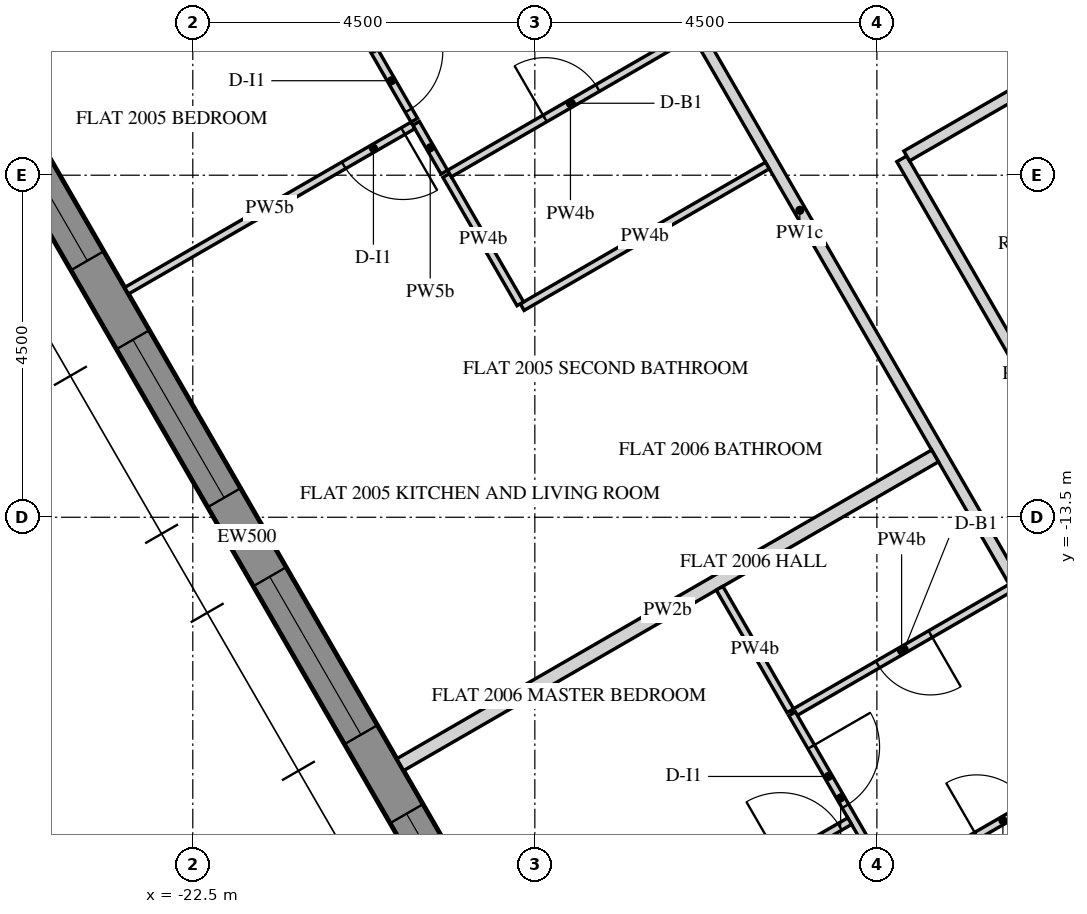
"""IFC4 building model, lengths in metres.
Left out: names, types, materials, properties, quantities, classifications, styles, units other than length and angle.
Written with IfcOpenShell. Run it as: python <this file> out.ifc"""

import sys

from ifc_helpers import new_model, si_unit, direction, frame, frame_2d, origin, place, context, subcontext, project, spatial, polyline, rectangle, outline, extrude, element, fill, save


model = new_model("IFC4")
c1 = context("Model", 3, precision=1e-05, world=origin(), true_north=direction((0.0, 1.0)))
c2 = subcontext(c1, "Body", "Model", "MODEL_VIEW")
j1 = project(units=[si_unit("LENGTHUNIT", "METRE"), si_unit("PLANEANGLEUNIT", "RADIAN")], contexts=[c1])
p1 = place(None, origin())
s1 = spatial("IfcSite", under=j1, at=p1, CompositionType="ELEMENT")
p2 = place(p1, origin())
s2 = spatial("IfcBuilding", under=s1, at=p2, CompositionType="ELEMENT")
p3 = place(p2, frame((0.0, 0.0, 260.1)))
s3 = spatial("IfcBuildingStorey", under=s2, at=p3, CompositionType="ELEMENT", Elevation=260.1)
p4 = place(p3, frame((-28.149, -2.745, -0.15), z_axis=(0.0, 0.0, 1.0), x_axis=(0.500003737743, -0.866023245787, 0.0)))
e1 = element("IfcWall", 1, at=p4, inside=s3, PredefinedType="SOLIDWALL", context=c2, shape_type="SweptSolid", body=[
    extrude(outline(polyline([(-0.021, -0.25), (25.468, -0.25), (25.421, 0.25), (0.021, 0.25), (-0.021, -0.25)])), origin(), (0.0, 0.0, 1.0), 3.9),
])
p5 = place(p4, frame((2.522, 0.0, 0.75)))
e2 = element("IfcOpeningElement", 2, at=p5, cuts=e1, PredefinedType="OPENING", context=c2, shape_type="SweptSolid", body=[
    extrude(rectangle(XDim=2.4, YDim=2.7, at=frame_2d((1.2, 1.35))), frame((0.0, 0.26, 0.0), z_axis=(0.0, -1.0, 0.0), x_axis=(1.0, 0.0, 0.0)), (0.0, 0.0, 1.0), 0.52),
])
p6 = place(p4, frame((6.122, 0.0, 0.75)))
e3 = element("IfcOpeningElement", 3, at=p6, cuts=e1, PredefinedType="OPENING", context=c2, shape_type="SweptSolid", body=[
    extrude(rectangle(XDim=2.4, YDim=2.7, at=frame_2d((1.2, 1.35))), frame((0.0, 0.26, 0.0), z_axis=(0.0, -1.0, 0.0), x_axis=(1.0, 0.0, 0.0)), (0.0, 0.0, 1.0), 0.52),
])
p7 = place(p4, frame((9.722, 0.0, 0.75)))
e4 = element("IfcOpeningElement", 4, at=p7, cuts=e1, PredefinedType="OPENING", context=c2, shape_type="SweptSolid", body=[
    extrude(rectangle(XDim=2.4, YDim=2.7, at=frame_2d((1.2, 1.35))), frame((0.0, 0.26, 0.0), z_axis=(0.0, -1.0, 0.0), x_axis=(1.0, 0.0, 0.0)), (0.0, 0.0, 1.0), 0.52),
])
p8 = place(p4, frame((13.323, 0.0, 0.75)))
e5 = element("IfcOpeningElement", 5, at=p8, cuts=e1, PredefinedType="OPENING", context=c2, shape_type="SweptSolid", body=[
    extrude(rectangle(XDim=2.4, YDim=2.7, at=frame_2d((1.2, 1.35))), frame((0.0, 0.26, 0.0), z_axis=(0.0, -1.0, 0.0), x_axis=(1.0, 0.0, 0.0)), (0.0, 0.0, 1.0), 0.52),
])
p9 = place(p4, frame((16.922, 0.0, 0.75)))
e6 = element("IfcOpeningElement", 6, at=p9, cuts=e1, PredefinedType="OPENING", context=c2, shape_type="SweptSolid", body=[
    extrude(rectangle(XDim=2.4, YDim=2.7, at=frame_2d((1.2, 1.35))), frame((0.0, 0.26, 0.0), z_axis=(0.0, -1.0, 0.0), x_axis=(1.0, 0.0, 0.0)), (0.0, 0.0, 1.0), 0.52),
])
p10 = place(p4, frame((20.522, 0.0, 0.75)))
e7 = element("IfcOpeningElement", 7, at=p10, cuts=e1, PredefinedType="OPENING", context=c2, shape_type="SweptSolid", body=[
    extrude(rectangle(XDim=2.4, YDim=2.7, at=frame_2d((1.2, 1.35))), frame((0.0, 0.26, 0.0), z_axis=(0.0, -1.0, 0.0), x_axis=(1.0, 0.0, 0.0)), (0.0, 0.0, 1.0), 0.52),
])
p11 = place(p3, frame((-12.471, 0.0, -0.15), z_axis=(0.0, 0.0, 1.0), x_axis=(0.499996419489, -0.866027470984, 0.0)))
e8 = element("IfcWall", 8, at=p11, inside=s3, PredefinedType="SHEAR", context=c2, shape_type="SweptSolid", body=[
    extrude(outline(polyline([(-0.115, -0.2), (12.586, -0.2), (12.355, 0.2), (0.115, 0.2), (-0.115, -0.2)])), origin(), (0.0, 0.0, 1.0), 3.9),
])
p12 = place(p11, frame((5.306, 0.0, 0.15)))
e9 = element("IfcOpeningElement", 9, at=p12, cuts=e8, PredefinedType="OPENING", context=c2, shape_type="SweptSolid", body=[
    extrude(rectangle(XDim=1.8, YDim=2.4, at=frame_2d((0.9, 1.2))), frame((0.0, 0.21, 0.0), z_axis=(0.0, -1.0, 0.0), x_axis=(1.0, 0.0, 0.0)), (0.0, 0.0, 1.0), 0.42),
])
p13 = place(p3, frame((-18.338, -2.838, 0.0), z_axis=(0.0, 0.0, 1.0), x_axis=(0.499999693481, -0.866025580753, 0.0)))
e10 = element("IfcWall", 10, at=p13, inside=s3, PredefinedType="PARTITIONING", context=c2, shape_type="SweptSolid", body=[
    extrude(rectangle(XDim=15.296, YDim=0.15, at=frame_2d((7.648, 0.0))), origin(), (0.0, 0.0, 1.0), 2.823),
])
p14 = place(p13, frame((2.925, 0.0, 0.0)))
e11 = element("IfcOpeningElement", 11, at=p14, cuts=e10, PredefinedType="OPENING", context=c2, shape_type="SweptSolid", body=[
    extrude(rectangle(XDim=1.0, YDim=2.1, at=frame_2d((0.5, 1.05))), frame((0.0, 0.085, 0.0), z_axis=(0.0, -1.0, 0.0), x_axis=(1.0, 0.0, 0.0)), (0.0, 0.0, 1.0), 0.17),
])
p15 = place(p13, frame((14.136, 0.0, 0.0)))
e12 = element("IfcOpeningElement", 12, at=p15, cuts=e10, PredefinedType="OPENING", context=c2, shape_type="SweptSolid", body=[
    extrude(rectangle(XDim=1.0, YDim=2.1, at=frame_2d((0.5, 1.05))), frame((0.0, 0.085, 0.0), z_axis=(0.0, -1.0, 0.0), x_axis=(1.0, 0.0, 0.0)), (0.0, 0.0, 1.0), 0.17),
])
p16 = place(p3, frame((-9.901, -14.451, 0.0), z_axis=(0.0, 0.0, 1.0), x_axis=(-0.49999161165, 0.866030246746, 0.0)))
e13 = element("IfcWall", 13, at=p16, inside=s3, PredefinedType="PARTITIONING", context=c2, shape_type="SweptSolid", body=[
    extrude(rectangle(XDim=6.543, YDim=0.15, at=frame_2d((3.271, 0.0))), origin(), (0.0, 0.0, 1.0), 2.823),
])
p17 = place(p3, frame((-13.108, -8.747, 0.0), z_axis=(0.0, 0.0, 1.0), x_axis=(0.866024684746, 0.500001245408, 0.0)))
e14 = element("IfcWall", 14, at=p17, inside=s3, PredefinedType="PARTITIONING", context=c2, shape_type="SweptSolid", body=[
    extrude(rectangle(XDim=4.725, YDim=0.15, at=frame_2d((2.363, 0.0))), origin(), (0.0, 0.0, 1.0), 2.823),
])
p18 = place(p3, frame((-19.191, -8.96, 0.0), z_axis=(0.0, 0.0, 1.0), x_axis=(-0.500036104519, 0.866004557827, 0.0)))
e15 = element("IfcWall", 15, at=p18, inside=s3, PredefinedType="PARTITIONING", context=c2, shape_type="SweptSolid", body=[
    extrude(rectangle(XDim=0.741, YDim=0.1, at=frame_2d((0.371, 0.0))), origin(), (0.0, 0.0, 1.0), 2.823),
])
p19 = place(p3, frame((-19.604, -8.345, 0.0), z_axis=(0.0, 0.0, 1.0), x_axis=(-0.866027639635, -0.499996127374, 0.0)))
e16 = element("IfcWall", 16, at=p19, inside=s3, PredefinedType="PARTITIONING", context=c2, shape_type="SweptSolid", body=[
    extrude(rectangle(XDim=4.35, YDim=0.1, at=frame_2d((2.175, 0.0))), origin(), (0.0, 0.0, 1.0), 2.823),
])
p20 = place(p19, frame((0.15, 0.0, 0.0)))
e17 = element("IfcOpeningElement", 17, at=p20, cuts=e16, PredefinedType="OPENING", context=c2, shape_type="SweptSolid", body=[
    extrude(rectangle(XDim=0.9, YDim=2.1, at=frame_2d((0.45, 1.05))), frame((0.0, 0.06, 0.0), z_axis=(0.0, -1.0, 0.0), x_axis=(1.0, 0.0, 0.0)), (0.0, 0.0, 1.0), 0.12),
])
p21 = place(p3, frame((-14.94, -8.873, 0.0), z_axis=(0.0, 0.0, 1.0), x_axis=(-0.866056803351, -0.499945610411, 0.0)))
e18 = element("IfcWall", 18, at=p21, inside=s3, PredefinedType="PARTITIONING", context=c2, shape_type="SweptSolid", body=[
    extrude(rectangle(XDim=3.725, YDim=0.1, at=frame_2d((1.863, 0.0))), origin(), (0.0, 0.0, 1.0), 2.823),
])
p22 = place(p3, frame((-18.191, -10.692, 0.0), z_axis=(0.0, 0.0, 1.0), x_axis=(-0.500043961785, 0.866000020948, 0.0)))
e19 = element("IfcWall", 19, at=p22, inside=s3, PredefinedType="PARTITIONING", context=c2, shape_type="SweptSolid", body=[
    extrude(rectangle(XDim=1.95, YDim=0.1, at=frame_2d((0.975, 0.0))), origin(), (0.0, 0.0, 1.0), 2.823),
])
p23 = place(p3, frame((-19.771, -16.755, 0.0), z_axis=(0.0, 0.0, 1.0), x_axis=(0.866022959057, 0.500004234368, 0.0)))
e20 = element("IfcWall", 20, at=p23, inside=s3, PredefinedType="PARTITIONING", context=c2, shape_type="SweptSolid", body=[
    extrude(rectangle(XDim=8.125, YDim=0.18, at=frame_2d((4.062, 0.0))), origin(), (0.0, 0.0, 1.0), 2.823),
])
p24 = place(p3, frame((-20.667, -6.403, 0.0), z_axis=(0.0, 0.0, 1.0), x_axis=(0.499999270699, -0.866025824846, 0.0)))
e21 = element("IfcWall", 21, at=p24, inside=s3, PredefinedType="PARTITIONING", context=c2, shape_type="SweptSolid", body=[
    extrude(rectangle(XDim=2.163, YDim=0.1, at=frame_2d((1.082, 0.0))), origin(), (0.0, 0.0, 1.0), 2.823),
])
p25 = place(p24, frame((1.113, 0.0, 0.0)))
e22 = element("IfcOpeningElement", 22, at=p25, cuts=e21, PredefinedType="OPENING", context=c2, shape_type="SweptSolid", body=[
    extrude(rectangle(XDim=0.9, YDim=2.1, at=frame_2d((0.45, 1.05))), frame((0.0, 0.06, 0.0), z_axis=(0.0, -1.0, 0.0), x_axis=(1.0, 0.0, 0.0)), (0.0, 0.0, 1.0), 0.12),
])
p26 = place(p3, frame((-19.123, -8.978, 0.0), z_axis=(0.0, 0.0, 1.0), x_axis=(0.866006363297, 0.500032977642, 0.0)))
e23 = element("IfcWall", 23, at=p26, inside=s3, PredefinedType="PARTITIONING", context=c2, shape_type="SweptSolid", body=[
    extrude(rectangle(XDim=3.675, YDim=0.1, at=frame_2d((1.837, 0.0))), origin(), (0.0, 0.0, 1.0), 2.823),
])
p27 = place(p26, frame((1.45, 0.0, 0.0)))
e24 = element("IfcOpeningElement", 24, at=p27, cuts=e23, PredefinedType="OPENING", context=c2, shape_type="SweptSolid", body=[
    extrude(rectangle(XDim=0.8, YDim=2.1, at=frame_2d((0.4, 1.05))), frame((0.0, 0.06, 0.0), z_axis=(0.0, -1.0, 0.0), x_axis=(1.0, 0.0, 0.0)), (0.0, 0.0, 1.0), 0.12),
])
p28 = place(p3, frame((-25.171, -7.402, 0.0), z_axis=(0.0, 0.0, 1.0), x_axis=(0.866013608182, 0.500020430026, 0.0)))
e25 = element("IfcWall", 25, at=p28, inside=s3, PredefinedType="PARTITIONING", context=c2, shape_type="SweptSolid", body=[
    extrude(rectangle(XDim=4.35, YDim=0.1, at=frame_2d((2.175, 0.0))), origin(), (0.0, 0.0, 1.0), 2.823),
])
p29 = place(p28, frame((3.3, 0.0, 0.0)))
e26 = element("IfcOpeningElement", 26, at=p29, cuts=e25, PredefinedType="OPENING", context=c2, shape_type="SweptSolid", body=[
    extrude(rectangle(XDim=0.9, YDim=2.1, at=frame_2d((0.45, 1.05))), frame((0.0, 0.06, 0.0), z_axis=(0.0, -1.0, 0.0), x_axis=(1.0, 0.0, 0.0)), (0.0, 0.0, 1.0), 0.12),
])
p30 = place(p3, frame((-4.831, -15.75, 0.0), z_axis=(0.0, 0.0, 1.0), x_axis=(-0.866012441049, -0.500022451445, 0.0)))
e27 = element("IfcWall", 27, at=p30, inside=s3, PredefinedType="PARTITIONING", context=c2, shape_type="SweptSolid", body=[
    extrude(rectangle(XDim=8.641, YDim=0.1, at=frame_2d((4.321, 0.0))), origin(), (0.0, 0.0, 1.0), 2.823),
])
p31 = place(p3, frame((-11.735, -14.425, 0.0), z_axis=(0.0, 0.0, 1.0), x_axis=(-0.866033959199, -0.499985181294, 0.0)))
e28 = element("IfcWall", 28, at=p31, inside=s3, PredefinedType="PARTITIONING", context=c2, shape_type="SweptSolid", body=[
    extrude(rectangle(XDim=3.325, YDim=0.1, at=frame_2d((1.662, 0.0))), origin(), (0.0, 0.0, 1.0), 2.823),
])
p32 = place(p31, frame((1.225, 0.0, 0.0)))
e29 = element("IfcOpeningElement", 29, at=p32, cuts=e28, PredefinedType="OPENING", context=c2, shape_type="SweptSolid", body=[
    extrude(rectangle(XDim=0.8, YDim=2.1, at=frame_2d((0.4, 1.05))), frame((0.0, 0.06, 0.0), z_axis=(0.0, -1.0, 0.0), x_axis=(1.0, 0.0, 0.0)), (0.0, 0.0, 1.0), 0.12),
])
p33 = place(p3, frame((-14.615, -16.085, 0.0), z_axis=(0.0, 0.0, 1.0), x_axis=(0.499943114462, -0.866058244174, 0.0)))
e30 = element("IfcWall", 30, at=p33, inside=s3, PredefinedType="PARTITIONING", context=c2, shape_type="SweptSolid", body=[
    extrude(rectangle(XDim=2.554, YDim=0.1, at=frame_2d((1.277, 0.0))), origin(), (0.0, 0.0, 1.0), 2.823),
])
p34 = place(p33, frame((0.502, 0.0, 0.0)))
e31 = element("IfcOpeningElement", 31, at=p34, cuts=e30, PredefinedType="OPENING", context=c2, shape_type="SweptSolid", body=[
    extrude(rectangle(XDim=0.9, YDim=2.1, at=frame_2d((0.45, 1.05))), frame((0.0, 0.06, 0.0), z_axis=(0.0, -1.0, 0.0), x_axis=(1.0, 0.0, 0.0)), (0.0, 0.0, 1.0), 0.12),
])
p35 = place(p3, frame((-13.314, -18.339, 0.0), z_axis=(0.0, 0.0, 1.0), x_axis=(0.866020827114, 0.500007926942, 0.0)))
e32 = element("IfcWall", 32, at=p35, inside=s3, PredefinedType="PARTITIONING", context=c2, shape_type="SweptSolid", body=[
    extrude(rectangle(XDim=4.541, YDim=0.1, at=frame_2d((2.27, 0.0))), origin(), (0.0, 0.0, 1.0), 2.823),
])
p36 = place(p35, frame((1.3, 0.0, 0.0)))
e33 = element("IfcOpeningElement", 33, at=p36, cuts=e32, PredefinedType="OPENING", context=c2, shape_type="SweptSolid", body=[
    extrude(rectangle(XDim=0.8, YDim=2.1, at=frame_2d((0.4, 1.05))), frame((0.0, 0.06, 0.0), z_axis=(0.0, -1.0, 0.0), x_axis=(1.0, 0.0, 0.0)), (0.0, 0.0, 1.0), 0.12),
])
p37 = place(p3, frame((-15.569, -14.433, 0.0), z_axis=(0.0, 0.0, 1.0), x_axis=(0.499960808225, -0.866048029984, 0.0)))
e34 = element("IfcWall", 34, at=p37, inside=s3, PredefinedType="PARTITIONING", context=c2, shape_type="SweptSolid", body=[
    extrude(rectangle(XDim=1.862, YDim=0.1, at=frame_2d((0.931, 0.0))), origin(), (0.0, 0.0, 1.0), 2.823),
])
p38 = place(p3, frame((-17.971, -19.873, 0.0), z_axis=(0.0, 0.0, 1.0), x_axis=(0.866020389056, 0.500008685663, 0.0)))
e35 = element("IfcWall", 35, at=p38, inside=s3, PredefinedType="PARTITIONING", context=c2, shape_type="SweptSolid", body=[
    extrude(rectangle(XDim=4.75, YDim=0.1, at=frame_2d((2.375, 0.0))), origin(), (0.0, 0.0, 1.0), 2.823),
])
p39 = place(p38, frame((3.7, 0.0, 0.0)))
e36 = element("IfcOpeningElement", 36, at=p39, cuts=e35, PredefinedType="OPENING", context=c2, shape_type="SweptSolid", body=[
    extrude(rectangle(XDim=0.9, YDim=2.1, at=frame_2d((0.45, 1.05))), frame((0.0, 0.06, 0.0), z_axis=(0.0, -1.0, 0.0), x_axis=(1.0, 0.0, 0.0)), (0.0, 0.0, 1.0), 0.12),
])
p40 = place(p6, frame((0.0, 0.18, 0.0)))
e37 = element("IfcWindow", 37, at=p40, inside=s3, PartitioningType="DOUBLE_PANEL_VERTICAL", PredefinedType="WINDOW", context=c2, shape_type="SweptSolid", body=[
    extrude(rectangle(XDim=2.4, YDim=2.7, at=frame_2d((1.2, 1.35))), frame((0.0, 0.03, 0.0), z_axis=(0.0, -1.0, 0.0), x_axis=(1.0, 0.0, 0.0)), (0.0, 0.0, 1.0), 0.06),
])
fill(e3, e37)
p41 = place(p7, frame((0.0, 0.18, 0.0)))
e38 = element("IfcWindow", 38, at=p41, inside=s3, PartitioningType="DOUBLE_PANEL_VERTICAL", PredefinedType="WINDOW", context=c2, shape_type="SweptSolid", body=[
    extrude(rectangle(XDim=2.4, YDim=2.7, at=frame_2d((1.2, 1.35))), frame((0.0, 0.03, 0.0), z_axis=(0.0, -1.0, 0.0), x_axis=(1.0, 0.0, 0.0)), (0.0, 0.0, 1.0), 0.06),
])
fill(e4, e38)
p42 = place(p8, frame((0.0, 0.18, 0.0)))
e39 = element("IfcWindow", 39, at=p42, inside=s3, PartitioningType="DOUBLE_PANEL_VERTICAL", PredefinedType="WINDOW", context=c2, shape_type="SweptSolid", body=[
    extrude(rectangle(XDim=2.4, YDim=2.7, at=frame_2d((1.2, 1.35))), frame((0.0, 0.03, 0.0), z_axis=(0.0, -1.0, 0.0), x_axis=(1.0, 0.0, 0.0)), (0.0, 0.0, 1.0), 0.06),
])
fill(e5, e39)
p43 = place(p9, frame((0.0, 0.18, 0.0)))
e40 = element("IfcWindow", 40, at=p43, inside=s3, PartitioningType="DOUBLE_PANEL_VERTICAL", PredefinedType="WINDOW", context=c2, shape_type="SweptSolid", body=[
    extrude(rectangle(XDim=2.4, YDim=2.7, at=frame_2d((1.2, 1.35))), frame((0.0, 0.03, 0.0), z_axis=(0.0, -1.0, 0.0), x_axis=(1.0, 0.0, 0.0)), (0.0, 0.0, 1.0), 0.06),
])
fill(e6, e40)
p44 = place(p25, origin())
e41 = element("IfcDoor", 41, at=p44, inside=s3, OperationType="SINGLE_SWING_RIGHT", PredefinedType="DOOR", context=c2, shape_type="SweptSolid", body=[
    extrude(rectangle(XDim=0.9, YDim=2.1, at=frame_2d((0.45, 1.05))), frame((0.0, 0.025, 0.0), z_axis=(0.0, -1.0, 0.0), x_axis=(1.0, 0.0, 0.0)), (0.0, 0.0, 1.0), 0.05),
])
fill(e22, e41)
p45 = place(p20, origin())
e42 = element("IfcDoor", 42, at=p45, inside=s3, OperationType="SINGLE_SWING_RIGHT", PredefinedType="DOOR", context=c2, shape_type="SweptSolid", body=[
    extrude(rectangle(XDim=0.9, YDim=2.1, at=frame_2d((0.45, 1.05))), frame((0.0, 0.025, 0.0), z_axis=(0.0, -1.0, 0.0), x_axis=(1.0, 0.0, 0.0)), (0.0, 0.0, 1.0), 0.05),
])
fill(e17, e42)
p46 = place(p27, origin())
e43 = element("IfcDoor", 43, at=p46, inside=s3, OperationType="SINGLE_SWING_LEFT", PredefinedType="DOOR", context=c2, shape_type="SweptSolid", body=[
    extrude(rectangle(XDim=0.8, YDim=2.1, at=frame_2d((0.4, 1.05))), frame((0.0, 0.025, 0.0), z_axis=(0.0, -1.0, 0.0), x_axis=(1.0, 0.0, 0.0)), (0.0, 0.0, 1.0), 0.05),
])
fill(e24, e43)
p47 = place(p32, origin())
e44 = element("IfcDoor", 44, at=p47, inside=s3, OperationType="SINGLE_SWING_RIGHT", PredefinedType="DOOR", context=c2, shape_type="SweptSolid", body=[
    extrude(rectangle(XDim=0.8, YDim=2.1, at=frame_2d((0.4, 1.05))), frame((0.0, 0.025, 0.0), z_axis=(0.0, -1.0, 0.0), x_axis=(1.0, 0.0, 0.0)), (0.0, 0.0, 1.0), 0.05),
])
fill(e29, e44)
p48 = place(p34, origin())
e45 = element("IfcDoor", 45, at=p48, inside=s3, OperationType="SINGLE_SWING_LEFT", PredefinedType="DOOR", context=c2, shape_type="SweptSolid", body=[
    extrude(rectangle(XDim=0.9, YDim=2.1, at=frame_2d((0.45, 1.05))), frame((0.0, 0.025, 0.0), z_axis=(0.0, -1.0, 0.0), x_axis=(1.0, 0.0, 0.0)), (0.0, 0.0, 1.0), 0.05),
])
fill(e31, e45)
p49 = place(p39, origin())
e46 = element("IfcDoor", 46, at=p49, inside=s3, OperationType="SINGLE_SWING_RIGHT", PredefinedType="DOOR", context=c2, shape_type="SweptSolid", body=[
    extrude(rectangle(XDim=0.9, YDim=2.1, at=frame_2d((0.45, 1.05))), frame((0.0, 0.025, 0.0), z_axis=(0.0, -1.0, 0.0), x_axis=(1.0, 0.0, 0.0)), (0.0, 0.0, 1.0), 0.05),
])
fill(e36, e46)
p50 = place(p36, origin())
e47 = element("IfcDoor", 47, at=p50, inside=s3, OperationType="SINGLE_SWING_RIGHT", PredefinedType="DOOR", context=c2, shape_type="SweptSolid", body=[
    extrude(rectangle(XDim=0.8, YDim=2.1, at=frame_2d((0.4, 1.05))), frame((0.0, 0.025, 0.0), z_axis=(0.0, -1.0, 0.0), x_axis=(1.0, 0.0, 0.0)), (0.0, 0.0, 1.0), 0.05),
])
fill(e33, e47)
save(model, sys.argv[1])
